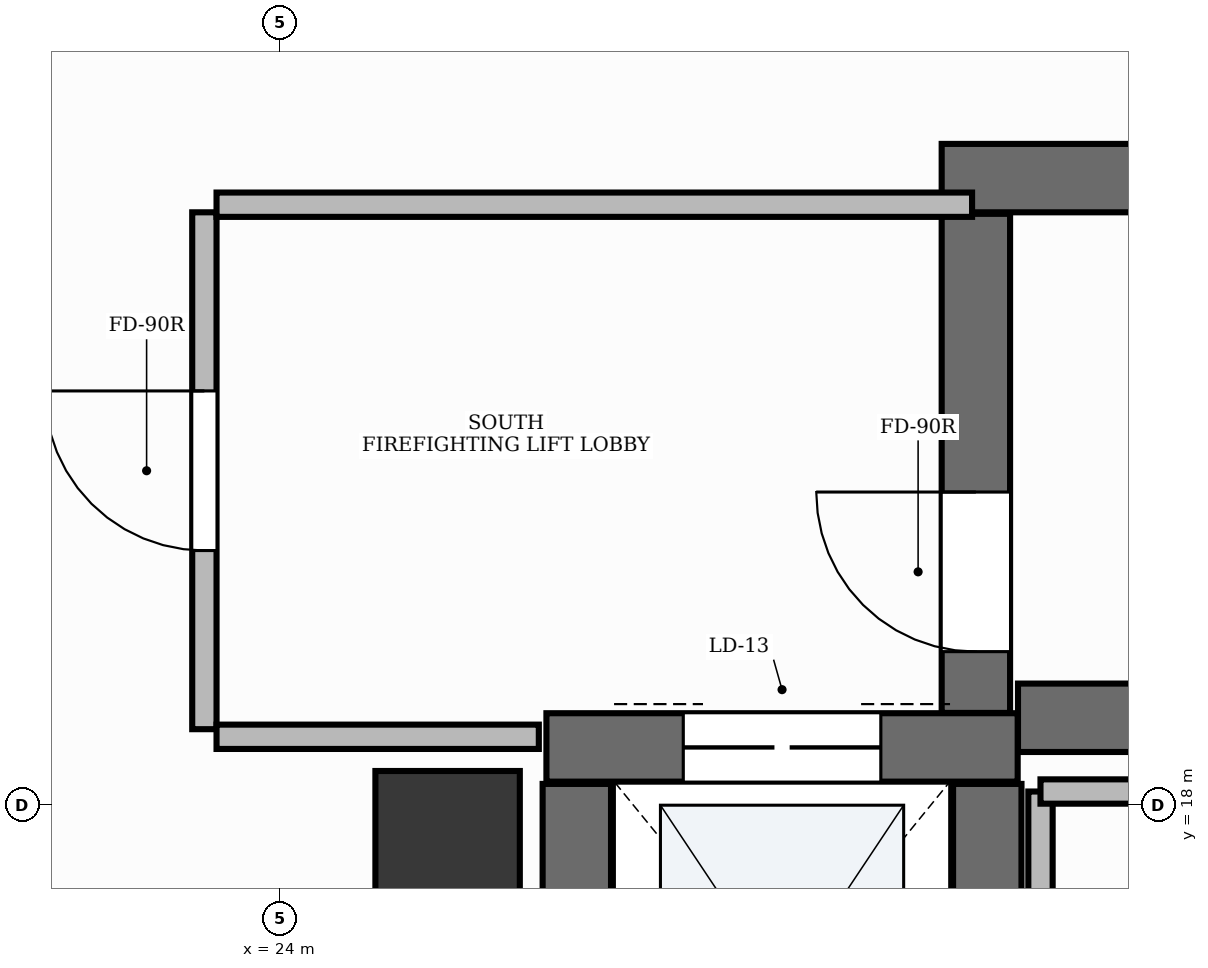
"""IFC4 building model, lengths in metres.
Left out: names, types, materials, properties, quantities, classifications, styles, units other than length and angle.
Written with IfcOpenShell. Run it as: python <this file> out.ifc"""

import sys

from ifc_helpers import new_model, si_unit, direction, frame, frame_2d, origin, origin_2d, place, context, subcontext, project, spatial, rectangle, extrude, element, fill, save


model = new_model("IFC4")
c1 = context("Model", 3, precision=1e-05, world=origin(), true_north=direction((0.0, 1.0)))
c2 = subcontext(c1, "Body", "Model", "MODEL_VIEW")
j1 = project(units=[si_unit("LENGTHUNIT", "METRE"), si_unit("PLANEANGLEUNIT", "RADIAN")], contexts=[c1])
p1 = place(None, origin())
s1 = spatial("IfcSite", under=j1, at=p1, CompositionType="ELEMENT")
p2 = place(p1, origin())
s2 = spatial("IfcBuilding", under=s1, at=p2, CompositionType="ELEMENT")
p3 = place(p2, frame((0.0, 0.0, 84.6)))
s3 = spatial("IfcBuildingStorey", under=s2, at=p3, CompositionType="ELEMENT", Elevation=84.6)
p4 = place(p3, frame((28.852, 18.575, 0.0), z_axis=(0.0, 0.0, 1.0), x_axis=(1.0, 0.0, 0.0)))
e1 = element("IfcWall", 1, at=p4, inside=s3, PredefinedType="SHEAR", context=c2, shape_type="SweptSolid", body=[
    extrude(rectangle(XDim=8.248, YDim=0.45, at=frame_2d((4.124, 0.0))), origin(), (0.0, 0.0, 1.0), 5.1),
])
p5 = place(p3, frame((28.35, 22.125, 0.0), z_axis=(0.0, 0.0, 1.0), x_axis=(1.0, 0.0, 0.0)))
e2 = element("IfcWall", 2, at=p5, inside=s3, PredefinedType="SHEAR", context=c2, shape_type="SweptSolid", body=[
    extrude(rectangle(XDim=8.75, YDim=0.45, at=frame_2d((4.375, 0.0))), origin(), (0.0, 0.0, 1.0), 5.1),
])
p6 = place(p3, frame((28.575, 18.607, 0.0), z_axis=(0.0, 0.0, 1.0), x_axis=(0.0, 1.0, 0.0)))
e3 = element("IfcWall", 3, at=p6, inside=s3, PredefinedType="SHEAR", context=c2, shape_type="SweptSolid", body=[
    extrude(rectangle(XDim=3.283, YDim=0.45, at=frame_2d((1.642, 0.0))), origin(), (0.0, 0.0, 1.0), 5.1),
])
p7 = place(p6, frame((0.403, 0.0, 0.0)))
e4 = element("IfcOpeningElement", 4, at=p7, cuts=e3, PredefinedType="OPENING", context=c2, shape_type="SweptSolid", body=[
    extrude(rectangle(XDim=1.05, YDim=2.15, at=frame_2d((0.525, 1.075))), frame((0.0, 0.24, 0.0), z_axis=(0.0, -1.0, 0.0), x_axis=(1.0, 0.0, 0.0)), (0.0, 0.0, 1.0), 0.48),
])
p8 = place(p3, frame((25.75, 18.38, 0.0), z_axis=(0.0, 0.0, 1.0), x_axis=(1.0, 0.0, 0.0)))
e5 = element("IfcWall", 5, at=p8, inside=s3, PredefinedType="SHEAR", context=c2, shape_type="SweptSolid", body=[
    extrude(rectangle(XDim=3.1, YDim=0.45, at=frame_2d((1.55, 0.0))), origin(), (0.0, 0.0, 1.0), 5.1),
])
p9 = place(p8, frame((0.9, 0.0, 0.0)))
e6 = element("IfcOpeningElement", 6, at=p9, cuts=e5, PredefinedType="OPENING", context=c2, shape_type="SweptSolid", body=[
    extrude(rectangle(XDim=1.3, YDim=2.2, at=frame_2d((0.65, 1.1))), frame((0.0, 0.24, 0.0), z_axis=(0.0, -1.0, 0.0), x_axis=(1.0, 0.0, 0.0)), (0.0, 0.0, 1.0), 0.48),
])
for number, where, z_axis, x_axis in (
    (7, (25.95, 15.44, 0.0), (0.0, 0.0, 1.0), (0.0, 1.0, 0.0)),
    (8, (28.65, 15.44, 0.0), (0.0, 0.0, 1.0), (0.0, 1.0, 0.0)),
):
    element("IfcWall", number, at=place(p3, frame(where, z_axis=z_axis, x_axis=x_axis)), inside=s3, PredefinedType="SHEAR", context=c2, shape_type="SweptSolid", body=[
        extrude(rectangle(XDim=2.7, YDim=0.45, at=frame_2d((1.35, 0.0))), origin(), (0.0, 0.0, 1.0), 5.1),
    ])
p10 = place(p3, frame((25.1, 17.75, -0.0), z_axis=(0.0, 0.0, 1.0), x_axis=(1.0, 0.0, 0.0)))
e9 = element("IfcColumn", 9, at=p10, inside=s3, PredefinedType="PILASTER", context=c2, shape_type="SweptSolid", body=[
    extrude(rectangle(XDim=0.95, YDim=0.95, at=origin_2d()), origin(), (0.0, 0.0, 1.0), 5.101),
])
p11 = place(p3, frame((23.5, 18.5, 0.0), z_axis=(0.0, 0.0, 1.0), x_axis=(0.0, 1.0, 0.0)))
e10 = element("IfcWall", 10, at=p11, inside=s3, PredefinedType="PARTITIONING", context=c2, shape_type="SweptSolid", body=[
    extrude(rectangle(XDim=3.4, YDim=0.16, at=frame_2d((1.7, 0.0))), origin(), (0.0, 0.0, 1.0), 3.96),
])
p12 = place(p11, frame((1.175, 0.0, 0.0)))
e11 = element("IfcOpeningElement", 11, at=p12, cuts=e10, PredefinedType="OPENING", context=c2, shape_type="SweptSolid", body=[
    extrude(rectangle(XDim=1.05, YDim=2.15, at=frame_2d((0.525, 1.075))), frame((0.0, 0.095, 0.0), z_axis=(0.0, -1.0, 0.0), x_axis=(1.0, 0.0, 0.0)), (0.0, 0.0, 1.0), 0.19),
])
p13 = place(p3, frame((23.58, 21.95, 0.0), z_axis=(0.0, 0.0, 1.0), x_axis=(1.0, 0.0, 0.0)))
e12 = element("IfcWall", 12, at=p13, inside=s3, PredefinedType="PARTITIONING", context=c2, shape_type="SweptSolid", body=[
    extrude(rectangle(XDim=4.97, YDim=0.16, at=frame_2d((2.485, 0.0))), origin(), (0.0, 0.0, 1.0), 3.96),
])
p14 = place(p3, frame((23.58, 18.45, 0.0), z_axis=(0.0, 0.0, 1.0), x_axis=(1.0, 0.0, 0.0)))
e13 = element("IfcWall", 13, at=p14, inside=s3, PredefinedType="PARTITIONING", context=c2, shape_type="SweptSolid", body=[
    extrude(rectangle(XDim=2.12, YDim=0.16, at=frame_2d((1.06, 0.0))), origin(), (0.0, 0.0, 1.0), 3.96),
])
p15 = place(p3, frame((29.0, 14.954, 0.0), z_axis=(0.0, 0.0, 1.0), x_axis=(0.0, 1.0, 0.0)))
e14 = element("IfcWall", 14, at=p15, inside=s3, PredefinedType="PARTITIONING", context=c2, shape_type="SweptSolid", body=[
    extrude(rectangle(XDim=3.136, YDim=0.16, at=frame_2d((1.568, 0.0))), origin(), (0.0, 0.0, 1.0), 3.96),
])
p16 = place(p3, frame((29.0, 18.09, 0.0), z_axis=(0.0, 0.0, 1.0), x_axis=(1.0, 0.0, 0.0)))
e15 = element("IfcWall", 15, at=p16, inside=s3, PredefinedType="PARTITIONING", context=c2, shape_type="SweptSolid", body=[
    extrude(rectangle(XDim=7.602, YDim=0.16, at=frame_2d((3.801, 0.0))), origin(), (0.0, 0.0, 1.0), 3.96),
])
p17 = place(p7, origin())
e16 = element("IfcDoor", 16, at=p17, inside=s3, OperationType="SINGLE_SWING_RIGHT", PredefinedType="DOOR", context=c2, shape_type="SweptSolid", body=[
    extrude(rectangle(XDim=1.05, YDim=2.15, at=frame_2d((0.525, 1.075))), frame((0.0, 0.025, 0.0), z_axis=(0.0, -1.0, 0.0), x_axis=(1.0, 0.0, 0.0)), (0.0, 0.0, 1.0), 0.05),
])
fill(e4, e16)
p18 = place(p9, origin())
e17 = element("IfcDoor", 17, at=p18, inside=s3, OperationType="DOUBLE_DOOR_SLIDING", PredefinedType="DOOR", context=c2, shape_type="SweptSolid", body=[
    extrude(rectangle(XDim=1.3, YDim=2.2, at=frame_2d((0.65, 1.1))), frame((0.0, 0.025, 0.0), z_axis=(0.0, -1.0, 0.0), x_axis=(1.0, 0.0, 0.0)), (0.0, 0.0, 1.0), 0.05),
])
fill(e6, e17)
p19 = place(p12, origin())
e18 = element("IfcDoor", 18, at=p19, inside=s3, OperationType="SINGLE_SWING_RIGHT", PredefinedType="DOOR", context=c2, shape_type="SweptSolid", body=[
    extrude(rectangle(XDim=1.05, YDim=2.15, at=frame_2d((0.525, 1.075))), frame((0.0, 0.025, 0.0), z_axis=(0.0, -1.0, 0.0), x_axis=(1.0, 0.0, 0.0)), (0.0, 0.0, 1.0), 0.05),
])
fill(e11, e18)
save(model, sys.argv[1])
